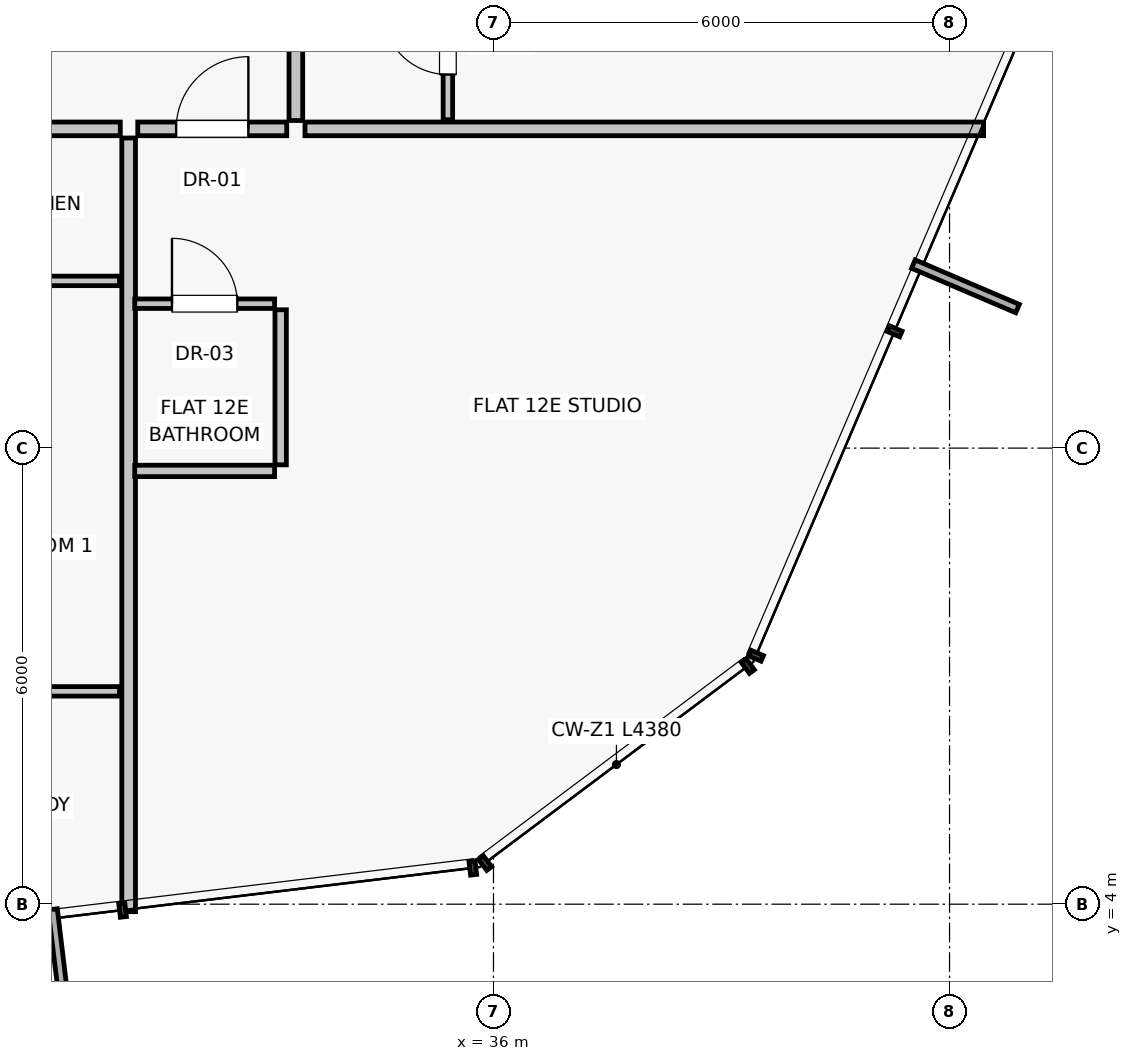
"""IFC4 building model, lengths in metres.
Left out: names, types, materials, properties, quantities, classifications, styles, units other than length and angle.
Written with IfcOpenShell. Run it as: python <this file> out.ifc"""

import sys

from ifc_helpers import new_model, si_unit, direction, frame, frame_2d, origin, place, context, subcontext, project, spatial, rectangle, extrude, source, transform, mapped, element, fill, save


model = new_model("IFC4")
c1 = context("Model", 3, precision=1e-05, world=origin(), true_north=direction((0.0, 1.0)))
c2 = subcontext(c1, "Body", "Model", "MODEL_VIEW")
j1 = project(units=[si_unit("LENGTHUNIT", "METRE"), si_unit("PLANEANGLEUNIT", "RADIAN")], contexts=[c1])
p1 = place(None, origin())
s1 = spatial("IfcSite", under=j1, at=p1, CompositionType="ELEMENT")
p2 = place(p1, origin())
s2 = spatial("IfcBuilding", under=s1, at=p2, CompositionType="ELEMENT")
p3 = place(p2, frame((0.0, 0.0, 46.8)))
s3 = spatial("IfcBuildingStorey", under=s2, at=p3, CompositionType="ELEMENT", Elevation=46.8)
p4 = place(p3, frame((31.2, 14.08, 0.0), z_axis=(0.0, 0.0, 1.0), x_axis=(0.0, -1.0, 0.0)))
e1 = element("IfcWall", 1, at=p4, inside=s3, PredefinedType="PARTITIONING", context=c2, shape_type="SweptSolid", body=[
    extrude(rectangle(XDim=10.178, YDim=0.18, at=frame_2d((5.089, 0.0))), origin(), (0.0, 0.0, 1.0), 3.0),
])
p5 = place(p3, frame((21.23, 14.2, 0.0), z_axis=(0.0, 0.0, 1.0), x_axis=(1.0, 0.0, 0.0)))
e2 = element("IfcWall", 2, at=p5, inside=s3, PredefinedType="PARTITIONING", context=c2, shape_type="SweptSolid", body=[
    extrude(rectangle(XDim=9.86, YDim=0.18, at=frame_2d((4.93, 0.0))), origin(), (0.0, 0.0, 1.0), 3.0),
])
p6 = place(p5, frame((3.276, 0.0, 0.0)))
e3 = element("IfcOpeningElement", 3, at=p6, cuts=e2, PredefinedType="OPENING", context=c2, shape_type="SweptSolid", body=[
    extrude(rectangle(XDim=0.95, YDim=2.02, at=frame_2d((0.475, 1.01))), frame((0.0, 0.1, 0.0), z_axis=(0.0, -1.0, 0.0), x_axis=(1.0, 0.0, 0.0)), (0.0, 0.0, 1.0), 0.2),
])
p7 = place(p3, frame((26.692, 6.8, 0.0), z_axis=(0.0, 0.0, 1.0), x_axis=(1.0, 0.0, 0.0)))
e4 = element("IfcWall", 4, at=p7, inside=s3, PredefinedType="PARTITIONING", context=c2, shape_type="SweptSolid", body=[
    extrude(rectangle(XDim=4.388, YDim=0.125, at=frame_2d((2.194, 0.0))), origin(), (0.0, 0.0, 1.0), 2.1),
])
p8 = place(p3, frame((26.692, 12.2, 0.0), z_axis=(0.0, 0.0, 1.0), x_axis=(1.0, 0.0, 0.0)))
e5 = element("IfcWall", 5, at=p8, inside=s3, PredefinedType="PARTITIONING", context=c2, shape_type="SweptSolid", body=[
    extrude(rectangle(XDim=4.388, YDim=0.125, at=frame_2d((2.194, 0.0))), origin(), (0.0, 0.0, 1.0), 3.0),
])
p9 = place(p3, frame((33.52, 14.2, 0.0), z_axis=(0.0, 0.0, 1.0), x_axis=(1.0, 0.0, 0.0)))
e6 = element("IfcWall", 6, at=p9, inside=s3, PredefinedType="PARTITIONING", context=c2, shape_type="SweptSolid", body=[
    extrude(rectangle(XDim=8.927, YDim=0.18, at=frame_2d((4.464, 0.0))), origin(), (0.0, 0.0, 1.0), 3.0),
])
p10 = place(p3, frame((33.4, 14.31, 0.0), z_axis=(0.0, 0.0, 1.0), x_axis=(0.0, 1.0, 0.0)))
e7 = element("IfcWall", 7, at=p10, inside=s3, PredefinedType="PARTITIONING", context=c2, shape_type="SweptSolid", body=[
    extrude(rectangle(XDim=12.108, YDim=0.18, at=frame_2d((6.054, 0.0))), origin(), (0.0, 0.0, 1.0), 3.0),
])
p11 = place(p10, frame((3.93, 0.0, 0.0)))
e8 = element("IfcOpeningElement", 8, at=p11, cuts=e7, PredefinedType="OPENING", context=c2, shape_type="SweptSolid", body=[
    extrude(rectangle(XDim=0.95, YDim=2.02, at=frame_2d((0.475, 1.01))), frame((0.0, 0.1, 0.0), z_axis=(0.0, -1.0, 0.0), x_axis=(1.0, 0.0, 0.0)), (0.0, 0.0, 1.0), 0.2),
])
p12 = place(p3, frame((35.4, 14.32, 0.0), z_axis=(0.0, 0.0, 1.0), x_axis=(0.0, 1.0, 0.0)))
e9 = element("IfcWall", 9, at=p12, inside=s3, PredefinedType="PARTITIONING", context=c2, shape_type="SweptSolid", body=[
    extrude(rectangle(XDim=2.05, YDim=0.125, at=frame_2d((1.025, 0.0))), origin(), (0.0, 0.0, 1.0), 3.0),
])
p13 = place(p12, frame((0.595, 0.0, 0.0)))
e10 = element("IfcOpeningElement", 10, at=p13, cuts=e9, PredefinedType="OPENING", context=c2, shape_type="SweptSolid", body=[
    extrude(rectangle(XDim=0.86, YDim=2.01, at=frame_2d((0.43, 1.005))), frame((0.0, 0.073, 0.0), z_axis=(0.0, -1.0, 0.0), x_axis=(1.0, 0.0, 0.0)), (0.0, 0.0, 1.0), 0.145),
])
p14 = place(p3, frame((31.32, 14.2, 0.0), z_axis=(0.0, 0.0, 1.0), x_axis=(1.0, 0.0, 0.0)))
e11 = element("IfcWall", 11, at=p14, inside=s3, PredefinedType="PARTITIONING", context=c2, shape_type="SweptSolid", body=[
    extrude(rectangle(XDim=1.96, YDim=0.18, at=frame_2d((0.98, 0.0))), origin(), (0.0, 0.0, 1.0), 3.0),
])
p15 = place(p14, frame((0.505, 0.0, 0.0)))
e12 = element("IfcOpeningElement", 12, at=p15, cuts=e11, PredefinedType="OPENING", context=c2, shape_type="SweptSolid", body=[
    extrude(rectangle(XDim=0.95, YDim=2.02, at=frame_2d((0.475, 1.01))), frame((0.0, 0.1, 0.0), z_axis=(0.0, -1.0, 0.0), x_axis=(1.0, 0.0, 0.0)), (0.0, 0.0, 1.0), 0.2),
])
p16 = place(p3, frame((31.28, 11.9, 0.0), z_axis=(0.0, 0.0, 1.0), x_axis=(1.0, 0.0, 0.0)))
e13 = element("IfcWall", 13, at=p16, inside=s3, PredefinedType="PARTITIONING", context=c2, shape_type="SweptSolid", body=[
    extrude(rectangle(XDim=1.84, YDim=0.125, at=frame_2d((0.92, 0.0))), origin(), (0.0, 0.0, 1.0), 3.0),
])
p17 = place(p16, frame((0.49, 0.0, 0.0)))
e14 = element("IfcOpeningElement", 14, at=p17, cuts=e13, PredefinedType="OPENING", context=c2, shape_type="SweptSolid", body=[
    extrude(rectangle(XDim=0.86, YDim=2.01, at=frame_2d((0.43, 1.005))), frame((0.0, 0.073, 0.0), z_axis=(0.0, -1.0, 0.0), x_axis=(1.0, 0.0, 0.0)), (0.0, 0.0, 1.0), 0.145),
])
p18 = place(p3, frame((31.28, 9.7, 0.0), z_axis=(0.0, 0.0, 1.0), x_axis=(1.0, 0.0, 0.0)))
e15 = element("IfcWall", 15, at=p18, inside=s3, PredefinedType="PARTITIONING", context=c2, shape_type="SweptSolid", body=[
    extrude(rectangle(XDim=1.84, YDim=0.15, at=frame_2d((0.92, 0.0))), origin(), (0.0, 0.0, 1.0), 3.0),
])
p19 = place(p3, frame((33.2, 9.78, 0.0), z_axis=(0.0, 0.0, 1.0), x_axis=(0.0, 1.0, 0.0)))
e16 = element("IfcWall", 16, at=p19, inside=s3, PredefinedType="PARTITIONING", context=c2, shape_type="SweptSolid", body=[
    extrude(rectangle(XDim=2.04, YDim=0.15, at=frame_2d((1.02, 0.0))), origin(), (0.0, 0.0, 1.0), 3.0),
])
m1 = source(origin(), c2, "Body", "SweptSolid", [
    extrude(rectangle(XDim=0.86, YDim=2.01, at=frame_2d((0.43, 1.005))), frame((0.0, 0.025, 0.0), z_axis=(0.0, -1.0, 0.0), x_axis=(1.0, 0.0, 0.0)), (0.0, 0.0, 1.0), 0.05),
])
p20 = place(p13, origin())
e17 = element("IfcDoor", 17, at=p20, inside=s3, OperationType="SINGLE_SWING_RIGHT", PredefinedType="DOOR", context=c2, shape_type="MappedRepresentation", body=[
    mapped(m1, transform((0.0, 0.0, 0.0), scale=1.0)),
])
fill(e10, e17)
m2 = source(origin(), c2, "Body", "SweptSolid", [
    extrude(rectangle(XDim=0.95, YDim=2.02, at=frame_2d((0.475, 1.01))), frame((0.0, 0.025, 0.0), z_axis=(0.0, -1.0, 0.0), x_axis=(1.0, 0.0, 0.0)), (0.0, 0.0, 1.0), 0.05),
])
p21 = place(p15, origin())
e18 = element("IfcDoor", 18, at=p21, inside=s3, OperationType="SINGLE_SWING_RIGHT", PredefinedType="DOOR", context=c2, shape_type="MappedRepresentation", body=[
    mapped(m2, transform((0.0, 0.0, 0.0), scale=1.0)),
])
fill(e12, e18)
p22 = place(p17, origin())
e19 = element("IfcDoor", 19, at=p22, inside=s3, OperationType="SINGLE_SWING_LEFT", PredefinedType="DOOR", context=c2, shape_type="MappedRepresentation", body=[
    mapped(m1, transform((0.0, 0.0, 0.0), scale=1.0)),
])
fill(e14, e19)
save(model, sys.argv[1])
